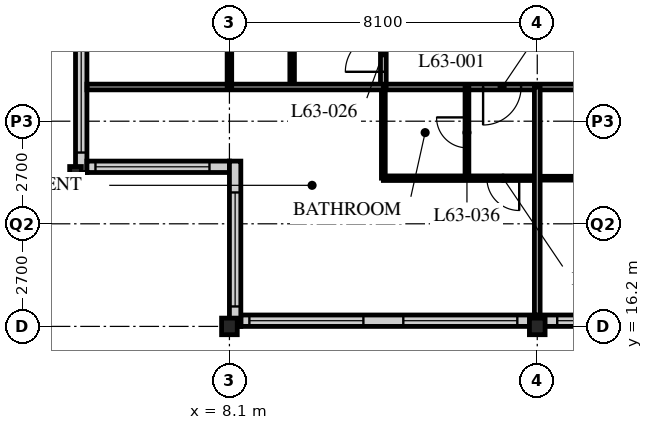
"""IFC4 building model, lengths in metres.
Left out: names, types, materials, properties, quantities, classifications, styles, units other than length and angle.
Written with IfcOpenShell. Run it as: python <this file> out.ifc"""

import sys

from ifc_helpers import new_model, si_unit, direction, frame, frame_2d, origin, origin_2d, place, context, subcontext, project, spatial, rectangle, i_section, extrude, element, fill, save


model = new_model("IFC4")
c1 = context("Model", 3, precision=1e-05, world=origin(), true_north=direction((0.0, 1.0)))
c2 = subcontext(c1, "Body", "Model", "MODEL_VIEW")
j1 = project(units=[si_unit("LENGTHUNIT", "METRE"), si_unit("PLANEANGLEUNIT", "RADIAN")], contexts=[c1])
p1 = place(None, origin())
s1 = spatial("IfcSite", under=j1, at=p1, CompositionType="ELEMENT")
p2 = place(p1, origin())
s2 = spatial("IfcBuilding", under=s1, at=p2, CompositionType="ELEMENT")
p3 = place(p2, frame((0.0, 0.0, 246.3)))
s3 = spatial("IfcBuildingStorey", under=s2, at=p3, CompositionType="ELEMENT", Elevation=246.3)
p4 = place(p3, frame((4.05, 20.25, 0.0), z_axis=(0.0, 0.0, 1.0), x_axis=(1.0, 0.0, 0.0)))
e1 = element("IfcColumn", 1, at=p4, inside=s3, PredefinedType="COLUMN", context=c2, shape_type="SweptSolid", body=[
    extrude(i_section(OverallWidth=0.307, OverallDepth=0.314, WebThickness=0.012, FlangeThickness=0.019, FilletRadius=0.015, at=origin_2d()), origin(), (0.0, 0.0, 1.0), 3.9),
])
for number, where, z_axis, x_axis in (
    (2, (8.1, 16.2, 0.0), (0.0, 0.0, 1.0), (1.0, 0.0, 0.0)),
    (3, (16.2, 16.2, 0.0), (0.0, 0.0, 1.0), (1.0, 0.0, 0.0)),
):
    element("IfcColumn", number, at=place(p3, frame(where, z_axis=z_axis, x_axis=x_axis)), inside=s3, PredefinedType="COLUMN", context=c2, shape_type="SweptSolid", body=[
        extrude(i_section(OverallWidth=0.412, OverallDepth=0.437, WebThickness=0.036, FlangeThickness=0.058, FilletRadius=0.015, at=origin_2d()), origin(), (0.0, 0.0, 1.0), 3.9),
    ])
p5 = place(p3, frame((8.4, 16.35, 0.0), z_axis=(0.0, 0.0, 1.0), x_axis=(1.0, 0.0, 0.0)))
e4 = element("IfcWall", 4, at=p5, inside=s3, PredefinedType="SOLIDWALL", context=c2, shape_type="SweptSolid", body=[
    extrude(rectangle(XDim=40.2, YDim=0.3, at=frame_2d((20.1, 0.0))), origin(), (0.0, 0.0, 1.0), 3.69),
])
p6 = place(p5, frame((0.225, 0.0, 0.6)))
e5 = element("IfcOpeningElement", 5, at=p6, cuts=e4, PredefinedType="OPENING", context=c2, shape_type="SweptSolid", body=[
    extrude(rectangle(XDim=3.0, YDim=2.4, at=frame_2d((1.5, 1.2))), frame((0.0, 0.16, 0.0), z_axis=(0.0, -1.0, 0.0), x_axis=(1.0, 0.0, 0.0)), (0.0, 0.0, 1.0), 0.32),
])
p7 = place(p5, frame((4.275, 0.0, 0.6)))
e6 = element("IfcOpeningElement", 6, at=p7, cuts=e4, PredefinedType="OPENING", context=c2, shape_type="SweptSolid", body=[
    extrude(rectangle(XDim=3.0, YDim=2.4, at=frame_2d((1.5, 1.2))), frame((0.0, 0.16, 0.0), z_axis=(0.0, -1.0, 0.0), x_axis=(1.0, 0.0, 0.0)), (0.0, 0.0, 1.0), 0.32),
])
p8 = place(p5, frame((8.325, 0.0, 0.6)))
e7 = element("IfcOpeningElement", 7, at=p8, cuts=e4, PredefinedType="OPENING", context=c2, shape_type="SweptSolid", body=[
    extrude(rectangle(XDim=3.0, YDim=2.4, at=frame_2d((1.5, 1.2))), frame((0.0, 0.16, 0.0), z_axis=(0.0, -1.0, 0.0), x_axis=(1.0, 0.0, 0.0)), (0.0, 0.0, 1.0), 0.32),
])
p9 = place(p5, frame((12.375, 0.0, 0.6)))
e8 = element("IfcOpeningElement", 8, at=p9, cuts=e4, PredefinedType="OPENING", context=c2, shape_type="SweptSolid", body=[
    extrude(rectangle(XDim=3.0, YDim=2.4, at=frame_2d((1.5, 1.2))), frame((0.0, 0.16, 0.0), z_axis=(0.0, -1.0, 0.0), x_axis=(1.0, 0.0, 0.0)), (0.0, 0.0, 1.0), 0.32),
])
p10 = place(p5, frame((16.425, 0.0, 0.6)))
e9 = element("IfcOpeningElement", 9, at=p10, cuts=e4, PredefinedType="OPENING", context=c2, shape_type="SweptSolid", body=[
    extrude(rectangle(XDim=3.0, YDim=2.4, at=frame_2d((1.5, 1.2))), frame((0.0, 0.16, 0.0), z_axis=(0.0, -1.0, 0.0), x_axis=(1.0, 0.0, 0.0)), (0.0, 0.0, 1.0), 0.32),
])
p11 = place(p5, frame((20.475, 0.0, 0.6)))
e10 = element("IfcOpeningElement", 10, at=p11, cuts=e4, PredefinedType="OPENING", context=c2, shape_type="SweptSolid", body=[
    extrude(rectangle(XDim=3.0, YDim=2.4, at=frame_2d((1.5, 1.2))), frame((0.0, 0.16, 0.0), z_axis=(0.0, -1.0, 0.0), x_axis=(1.0, 0.0, 0.0)), (0.0, 0.0, 1.0), 0.32),
])
p12 = place(p5, frame((24.525, 0.0, 0.6)))
e11 = element("IfcOpeningElement", 11, at=p12, cuts=e4, PredefinedType="OPENING", context=c2, shape_type="SweptSolid", body=[
    extrude(rectangle(XDim=3.0, YDim=2.4, at=frame_2d((1.5, 1.2))), frame((0.0, 0.16, 0.0), z_axis=(0.0, -1.0, 0.0), x_axis=(1.0, 0.0, 0.0)), (0.0, 0.0, 1.0), 0.32),
])
p13 = place(p5, frame((28.575, 0.0, 0.6)))
e12 = element("IfcOpeningElement", 12, at=p13, cuts=e4, PredefinedType="OPENING", context=c2, shape_type="SweptSolid", body=[
    extrude(rectangle(XDim=3.0, YDim=2.4, at=frame_2d((1.5, 1.2))), frame((0.0, 0.16, 0.0), z_axis=(0.0, -1.0, 0.0), x_axis=(1.0, 0.0, 0.0)), (0.0, 0.0, 1.0), 0.32),
])
p14 = place(p5, frame((32.625, 0.0, 0.6)))
e13 = element("IfcOpeningElement", 13, at=p14, cuts=e4, PredefinedType="OPENING", context=c2, shape_type="SweptSolid", body=[
    extrude(rectangle(XDim=3.0, YDim=2.4, at=frame_2d((1.5, 1.2))), frame((0.0, 0.16, 0.0), z_axis=(0.0, -1.0, 0.0), x_axis=(1.0, 0.0, 0.0)), (0.0, 0.0, 1.0), 0.32),
])
p15 = place(p5, frame((36.675, 0.0, 0.6)))
e14 = element("IfcOpeningElement", 14, at=p15, cuts=e4, PredefinedType="OPENING", context=c2, shape_type="SweptSolid", body=[
    extrude(rectangle(XDim=3.0, YDim=2.4, at=frame_2d((1.5, 1.2))), frame((0.0, 0.16, 0.0), z_axis=(0.0, -1.0, 0.0), x_axis=(1.0, 0.0, 0.0)), (0.0, 0.0, 1.0), 0.32),
])
p16 = place(p3, frame((4.2, 24.6, 0.0), z_axis=(0.0, 0.0, 1.0), x_axis=(0.0, -1.0, 0.0)))
e15 = element("IfcWall", 15, at=p16, inside=s3, PredefinedType="SOLIDWALL", context=c2, shape_type="SweptSolid", body=[
    extrude(rectangle(XDim=4.35, YDim=0.3, at=frame_2d((2.175, 0.0))), origin(), (0.0, 0.0, 1.0), 3.69),
])
p17 = place(p16, frame((0.825, 0.0, 0.6)))
e16 = element("IfcOpeningElement", 16, at=p17, cuts=e15, PredefinedType="OPENING", context=c2, shape_type="SweptSolid", body=[
    extrude(rectangle(XDim=3.0, YDim=2.3, at=frame_2d((1.5, 1.15))), frame((0.0, 0.16, 0.0), z_axis=(0.0, -1.0, 0.0), x_axis=(1.0, 0.0, 0.0)), (0.0, 0.0, 1.0), 0.32),
])
p18 = place(p3, frame((4.35, 20.4, 0.0), z_axis=(0.0, 0.0, 1.0), x_axis=(1.0, 0.0, 0.0)))
e17 = element("IfcWall", 17, at=p18, inside=s3, PredefinedType="SOLIDWALL", context=c2, shape_type="SweptSolid", body=[
    extrude(rectangle(XDim=3.75, YDim=0.3, at=frame_2d((1.875, 0.0))), origin(), (0.0, 0.0, 1.0), 3.69),
])
p19 = place(p18, frame((0.225, 0.0, 0.6)))
e18 = element("IfcOpeningElement", 18, at=p19, cuts=e17, PredefinedType="OPENING", context=c2, shape_type="SweptSolid", body=[
    extrude(rectangle(XDim=3.0, YDim=2.3, at=frame_2d((1.5, 1.15))), frame((0.0, 0.16, 0.0), z_axis=(0.0, -1.0, 0.0), x_axis=(1.0, 0.0, 0.0)), (0.0, 0.0, 1.0), 0.32),
])
p20 = place(p3, frame((8.25, 20.55, 0.0), z_axis=(0.0, 0.0, 1.0), x_axis=(0.0, -1.0, 0.0)))
e19 = element("IfcWall", 19, at=p20, inside=s3, PredefinedType="SOLIDWALL", context=c2, shape_type="SweptSolid", body=[
    extrude(rectangle(XDim=4.35, YDim=0.3, at=frame_2d((2.175, 0.0))), origin(), (0.0, 0.0, 1.0), 3.69),
])
p21 = place(p20, frame((0.825, 0.0, 0.6)))
e20 = element("IfcOpeningElement", 20, at=p21, cuts=e19, PredefinedType="OPENING", context=c2, shape_type="SweptSolid", body=[
    extrude(rectangle(XDim=3.0, YDim=2.3, at=frame_2d((1.5, 1.15))), frame((0.0, 0.16, 0.0), z_axis=(0.0, -1.0, 0.0), x_axis=(1.0, 0.0, 0.0)), (0.0, 0.0, 1.0), 0.32),
])
p22 = place(p3, frame((12.15, 22.5, 0.0), z_axis=(0.0, 0.0, 1.0), x_axis=(1.0, 0.0, 0.0)))
e21 = element("IfcWall", 21, at=p22, inside=s3, PredefinedType="PARTITIONING", context=c2, shape_type="SweptSolid", body=[
    extrude(rectangle(XDim=24.3, YDim=0.15, at=frame_2d((12.15, 0.0))), origin(), (0.0, 0.0, 1.0), 3.69),
])
p23 = place(p22, frame((6.4, 0.0, 0.0)))
e22 = element("IfcOpeningElement", 22, at=p23, cuts=e21, PredefinedType="OPENING", context=c2, shape_type="SweptSolid", body=[
    extrude(rectangle(XDim=1.0, YDim=2.1, at=frame_2d((0.5, 1.05))), frame((0.0, 0.085, 0.0), z_axis=(0.0, -1.0, 0.0), x_axis=(1.0, 0.0, 0.0)), (0.0, 0.0, 1.0), 0.17),
])
p24 = place(p22, frame((8.5, 0.0, 0.0)))
e23 = element("IfcOpeningElement", 23, at=p24, cuts=e21, PredefinedType="OPENING", context=c2, shape_type="SweptSolid", body=[
    extrude(rectangle(XDim=1.0, YDim=2.1, at=frame_2d((0.5, 1.05))), frame((0.0, 0.085, 0.0), z_axis=(0.0, -1.0, 0.0), x_axis=(1.0, 0.0, 0.0)), (0.0, 0.0, 1.0), 0.17),
])
p25 = place(p22, frame((16.6, 0.0, 0.0)))
e24 = element("IfcOpeningElement", 24, at=p25, cuts=e21, PredefinedType="OPENING", context=c2, shape_type="SweptSolid", body=[
    extrude(rectangle(XDim=1.0, YDim=2.1, at=frame_2d((0.5, 1.05))), frame((0.0, 0.085, 0.0), z_axis=(0.0, -1.0, 0.0), x_axis=(1.0, 0.0, 0.0)), (0.0, 0.0, 1.0), 0.17),
])
p26 = place(p22, frame((2.625, 0.0, 0.0)))
e25 = element("IfcOpeningElement", 25, at=p26, cuts=e21, PredefinedType="OPENING", context=c2, shape_type="SweptSolid", body=[
    extrude(rectangle(XDim=1.0, YDim=2.1, at=frame_2d((0.5, 1.05))), frame((0.0, 0.085, 0.0), z_axis=(0.0, -1.0, 0.0), x_axis=(1.0, 0.0, 0.0)), (0.0, 0.0, 1.0), 0.17),
])
p27 = place(p3, frame((12.15, 22.5, 0.0), z_axis=(0.0, 0.0, 1.0), x_axis=(0.0, 1.0, 0.0)))
e26 = element("IfcWall", 26, at=p27, inside=s3, PredefinedType="PARTITIONING", context=c2, shape_type="SweptSolid", body=[
    extrude(rectangle(XDim=30.15, YDim=0.15, at=frame_2d((15.075, 0.0))), origin(), (0.0, 0.0, 1.0), 3.69),
])
p28 = place(p27, frame((0.4, 0.0, 0.0)))
e27 = element("IfcOpeningElement", 27, at=p28, cuts=e26, PredefinedType="OPENING", context=c2, shape_type="SweptSolid", body=[
    extrude(rectangle(XDim=1.0, YDim=2.1, at=frame_2d((0.5, 1.05))), frame((0.0, 0.085, 0.0), z_axis=(0.0, -1.0, 0.0), x_axis=(1.0, 0.0, 0.0)), (0.0, 0.0, 1.0), 0.17),
])
p29 = place(p27, frame((24.4, 0.0, 0.0)))
e28 = element("IfcOpeningElement", 28, at=p29, cuts=e26, PredefinedType="OPENING", context=c2, shape_type="SweptSolid", body=[
    extrude(rectangle(XDim=1.0, YDim=2.1, at=frame_2d((0.5, 1.05))), frame((0.0, 0.085, 0.0), z_axis=(0.0, -1.0, 0.0), x_axis=(1.0, 0.0, 0.0)), (0.0, 0.0, 1.0), 0.17),
])
p30 = place(p27, frame((28.45, 0.0, 0.0)))
e29 = element("IfcOpeningElement", 29, at=p30, cuts=e26, PredefinedType="OPENING", context=c2, shape_type="SweptSolid", body=[
    extrude(rectangle(XDim=1.0, YDim=2.1, at=frame_2d((0.5, 1.05))), frame((0.0, 0.085, 0.0), z_axis=(0.0, -1.0, 0.0), x_axis=(1.0, 0.0, 0.0)), (0.0, 0.0, 1.0), 0.17),
])
p31 = place(p3, frame((16.2, 20.1, 0.0), z_axis=(0.0, 0.0, 1.0), x_axis=(1.0, 0.0, 0.0)))
e30 = element("IfcWall", 30, at=p31, inside=s3, PredefinedType="PARTITIONING", context=c2, shape_type="SweptSolid", body=[
    extrude(rectangle(XDim=2.2, YDim=0.1, at=frame_2d((1.1, 0.0))), origin(), (0.0, 0.0, 1.0), 3.69),
])
p32 = place(p3, frame((9.75, 22.5, 0.0), z_axis=(0.0, 0.0, 1.0), x_axis=(0.0, 1.0, 0.0)))
e31 = element("IfcWall", 31, at=p32, inside=s3, PredefinedType="PARTITIONING", context=c2, shape_type="SweptSolid", body=[
    extrude(rectangle(XDim=22.05, YDim=0.12, at=frame_2d((11.025, 0.0))), origin(), (0.0, 0.0, 1.0), 3.69),
])
p33 = place(p32, frame((0.975, 0.0, 0.0)))
e32 = element("IfcOpeningElement", 32, at=p33, cuts=e31, PredefinedType="OPENING", context=c2, shape_type="SweptSolid", body=[
    extrude(rectangle(XDim=0.85, YDim=2.1, at=frame_2d((0.425, 1.05))), frame((0.0, 0.07, 0.0), z_axis=(0.0, -1.0, 0.0), x_axis=(1.0, 0.0, 0.0)), (0.0, 0.0, 1.0), 0.14),
])
p34 = place(p32, frame((10.225, 0.0, 0.0)))
e33 = element("IfcOpeningElement", 33, at=p34, cuts=e31, PredefinedType="OPENING", context=c2, shape_type="SweptSolid", body=[
    extrude(rectangle(XDim=0.85, YDim=2.1, at=frame_2d((0.425, 1.05))), frame((0.0, 0.07, 0.0), z_axis=(0.0, -1.0, 0.0), x_axis=(1.0, 0.0, 0.0)), (0.0, 0.0, 1.0), 0.14),
])
p35 = place(p32, frame((14.275, 0.0, 0.0)))
e34 = element("IfcOpeningElement", 34, at=p35, cuts=e31, PredefinedType="OPENING", context=c2, shape_type="SweptSolid", body=[
    extrude(rectangle(XDim=0.85, YDim=2.1, at=frame_2d((0.425, 1.05))), frame((0.0, 0.07, 0.0), z_axis=(0.0, -1.0, 0.0), x_axis=(1.0, 0.0, 0.0)), (0.0, 0.0, 1.0), 0.14),
])
p36 = place(p32, frame((18.325, 0.0, 0.0)))
e35 = element("IfcOpeningElement", 35, at=p36, cuts=e31, PredefinedType="OPENING", context=c2, shape_type="SweptSolid", body=[
    extrude(rectangle(XDim=0.85, YDim=2.1, at=frame_2d((0.425, 1.05))), frame((0.0, 0.07, 0.0), z_axis=(0.0, -1.0, 0.0), x_axis=(1.0, 0.0, 0.0)), (0.0, 0.0, 1.0), 0.14),
])
p37 = place(p3, frame((12.15, 20.1, 0.0), z_axis=(0.0, 0.0, 1.0), x_axis=(1.0, 0.0, 0.0)))
e36 = element("IfcWall", 36, at=p37, inside=s3, PredefinedType="PARTITIONING", context=c2, shape_type="SweptSolid", body=[
    extrude(rectangle(XDim=4.05, YDim=0.12, at=frame_2d((2.025, 0.0))), origin(), (0.0, 0.0, 1.0), 3.69),
])
p38 = place(p37, frame((2.725, 0.0, 0.0)))
e37 = element("IfcOpeningElement", 37, at=p38, cuts=e36, PredefinedType="OPENING", context=c2, shape_type="SweptSolid", body=[
    extrude(rectangle(XDim=0.85, YDim=2.1, at=frame_2d((0.425, 1.05))), frame((0.0, 0.07, 0.0), z_axis=(0.0, -1.0, 0.0), x_axis=(1.0, 0.0, 0.0)), (0.0, 0.0, 1.0), 0.14),
])
p39 = place(p3, frame((14.35, 22.5, 0.0), z_axis=(0.0, 0.0, 1.0), x_axis=(0.0, -1.0, 0.0)))
e38 = element("IfcWall", 38, at=p39, inside=s3, PredefinedType="PARTITIONING", context=c2, shape_type="SweptSolid", body=[
    extrude(rectangle(XDim=2.4, YDim=0.1, at=frame_2d((1.2, 0.0))), origin(), (0.0, 0.0, 1.0), 3.69),
])
p40 = place(p39, frame((0.8, 0.0, 0.0)))
e39 = element("IfcOpeningElement", 39, at=p40, cuts=e38, PredefinedType="OPENING", context=c2, shape_type="SweptSolid", body=[
    extrude(rectangle(XDim=0.8, YDim=2.1, at=frame_2d((0.4, 1.05))), frame((0.0, 0.06, 0.0), z_axis=(0.0, -1.0, 0.0), x_axis=(1.0, 0.0, 0.0)), (0.0, 0.0, 1.0), 0.12),
])
p41 = place(p3, frame((12.15, 22.5, 0.0), z_axis=(0.0, 0.0, 1.0), x_axis=(0.0, -1.0, 0.0)))
e40 = element("IfcWall", 40, at=p41, inside=s3, PredefinedType="PARTITIONING", context=c2, shape_type="SweptSolid", body=[
    extrude(rectangle(XDim=2.4, YDim=0.1, at=frame_2d((1.2, 0.0))), origin(), (0.0, 0.0, 1.0), 3.69),
])
p42 = place(p3, frame((4.35, 22.5, 0.0), z_axis=(0.0, 0.0, 1.0), x_axis=(1.0, 0.0, 0.0)))
e41 = element("IfcWall", 41, at=p42, inside=s3, PredefinedType="PARTITIONING", context=c2, shape_type="SweptSolid", body=[
    extrude(rectangle(XDim=7.8, YDim=0.15, at=frame_2d((3.9, 0.0))), origin(), (0.0, 0.0, 1.0), 3.69),
])
p43 = place(p3, frame((16.2, 22.5, 0.0), z_axis=(0.0, 0.0, 1.0), x_axis=(0.0, -1.0, 0.0)))
e42 = element("IfcWall", 42, at=p43, inside=s3, PredefinedType="PARTITIONING", context=c2, shape_type="SweptSolid", body=[
    extrude(rectangle(XDim=6.0, YDim=0.15, at=frame_2d((3.0, 0.0))), origin(), (0.0, 0.0, 1.0), 3.078),
])
p44 = place(p3, frame((8.1, 22.5, 0.0), z_axis=(0.0, 0.0, 1.0), x_axis=(0.0, 1.0, 0.0)))
e43 = element("IfcWall", 43, at=p44, inside=s3, PredefinedType="PARTITIONING", context=c2, shape_type="SweptSolid", body=[
    extrude(rectangle(XDim=1.597, YDim=0.12, at=frame_2d((0.798, 0.0))), origin(), (0.0, 0.0, 1.0), 3.078),
])
p45 = place(p6, origin())
e44 = element("IfcWindow", 44, at=p45, inside=s3, PartitioningType="SINGLE_PANEL", PredefinedType="WINDOW", context=c2, shape_type="SweptSolid", body=[
    extrude(rectangle(XDim=3.0, YDim=2.4, at=frame_2d((1.5, 1.2))), frame((0.0, 0.03, 0.0), z_axis=(0.0, -1.0, 0.0), x_axis=(1.0, 0.0, 0.0)), (0.0, 0.0, 1.0), 0.06),
])
fill(e5, e44)
p46 = place(p7, origin())
e45 = element("IfcWindow", 45, at=p46, inside=s3, PartitioningType="SINGLE_PANEL", PredefinedType="WINDOW", context=c2, shape_type="SweptSolid", body=[
    extrude(rectangle(XDim=3.0, YDim=2.4, at=frame_2d((1.5, 1.2))), frame((0.0, 0.03, 0.0), z_axis=(0.0, -1.0, 0.0), x_axis=(1.0, 0.0, 0.0)), (0.0, 0.0, 1.0), 0.06),
])
fill(e6, e45)
p47 = place(p8, origin())
e46 = element("IfcWindow", 46, at=p47, inside=s3, PartitioningType="SINGLE_PANEL", PredefinedType="WINDOW", context=c2, shape_type="SweptSolid", body=[
    extrude(rectangle(XDim=3.0, YDim=2.4, at=frame_2d((1.5, 1.2))), frame((0.0, 0.03, 0.0), z_axis=(0.0, -1.0, 0.0), x_axis=(1.0, 0.0, 0.0)), (0.0, 0.0, 1.0), 0.06),
])
fill(e7, e46)
p48 = place(p17, origin())
e47 = element("IfcWindow", 47, at=p48, inside=s3, PartitioningType="SINGLE_PANEL", PredefinedType="WINDOW", context=c2, shape_type="SweptSolid", body=[
    extrude(rectangle(XDim=3.0, YDim=2.3, at=frame_2d((1.5, 1.15))), frame((0.0, 0.03, 0.0), z_axis=(0.0, -1.0, 0.0), x_axis=(1.0, 0.0, 0.0)), (0.0, 0.0, 1.0), 0.06),
])
fill(e16, e47)
p49 = place(p19, origin())
e48 = element("IfcWindow", 48, at=p49, inside=s3, PartitioningType="SINGLE_PANEL", PredefinedType="WINDOW", context=c2, shape_type="SweptSolid", body=[
    extrude(rectangle(XDim=3.0, YDim=2.3, at=frame_2d((1.5, 1.15))), frame((0.0, 0.03, 0.0), z_axis=(0.0, -1.0, 0.0), x_axis=(1.0, 0.0, 0.0)), (0.0, 0.0, 1.0), 0.06),
])
fill(e18, e48)
p50 = place(p21, origin())
e49 = element("IfcWindow", 49, at=p50, inside=s3, PartitioningType="SINGLE_PANEL", PredefinedType="WINDOW", context=c2, shape_type="SweptSolid", body=[
    extrude(rectangle(XDim=3.0, YDim=2.3, at=frame_2d((1.5, 1.15))), frame((0.0, 0.03, 0.0), z_axis=(0.0, -1.0, 0.0), x_axis=(1.0, 0.0, 0.0)), (0.0, 0.0, 1.0), 0.06),
])
fill(e20, e49)
p51 = place(p28, origin())
e50 = element("IfcDoor", 50, at=p51, inside=s3, OperationType="SINGLE_SWING_LEFT", PredefinedType="DOOR", context=c2, shape_type="SweptSolid", body=[
    extrude(rectangle(XDim=1.0, YDim=2.1, at=frame_2d((0.5, 1.05))), frame((0.0, 0.025, 0.0), z_axis=(0.0, -1.0, 0.0), x_axis=(1.0, 0.0, 0.0)), (0.0, 0.0, 1.0), 0.05),
])
fill(e27, e50)
p52 = place(p40, origin())
e51 = element("IfcDoor", 51, at=p52, inside=s3, OperationType="SINGLE_SWING_RIGHT", PredefinedType="DOOR", context=c2, shape_type="SweptSolid", body=[
    extrude(rectangle(XDim=0.8, YDim=2.1, at=frame_2d((0.4, 1.05))), frame((0.0, 0.025, 0.0), z_axis=(0.0, -1.0, 0.0), x_axis=(1.0, 0.0, 0.0)), (0.0, 0.0, 1.0), 0.05),
])
fill(e39, e51)
p53 = place(p26, origin())
e52 = element("IfcDoor", 52, at=p53, inside=s3, OperationType="SINGLE_SWING_RIGHT", PredefinedType="DOOR", context=c2, shape_type="SweptSolid", body=[
    extrude(rectangle(XDim=1.0, YDim=2.1, at=frame_2d((0.5, 1.05))), frame((0.0, 0.025, 0.0), z_axis=(0.0, -1.0, 0.0), x_axis=(1.0, 0.0, 0.0)), (0.0, 0.0, 1.0), 0.05),
])
fill(e25, e52)
p54 = place(p38, origin())
e53 = element("IfcDoor", 53, at=p54, inside=s3, OperationType="SINGLE_SWING_LEFT", PredefinedType="DOOR", context=c2, shape_type="SweptSolid", body=[
    extrude(rectangle(XDim=0.85, YDim=2.1, at=frame_2d((0.425, 1.05))), frame((0.0, 0.025, 0.0), z_axis=(0.0, -1.0, 0.0), x_axis=(1.0, 0.0, 0.0)), (0.0, 0.0, 1.0), 0.05),
])
fill(e37, e53)
save(model, sys.argv[1])
